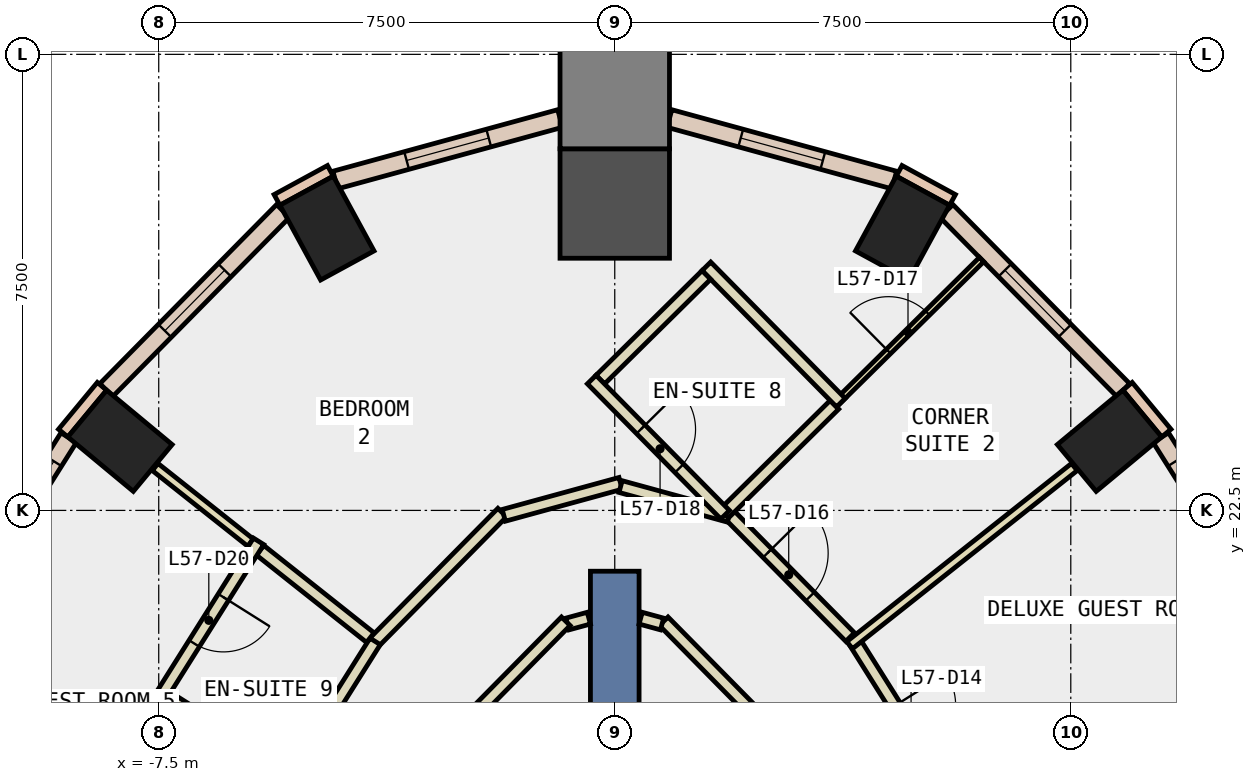
"""IFC4 building model, lengths in metres.
Left out: names, types, materials, properties, quantities, classifications, styles, units other than length and angle.
Written with IfcOpenShell. Run it as: python <this file> out.ifc"""

import sys

from ifc_helpers import new_model, si_unit, direction, frame, frame_2d, origin, origin_2d, place, context, subcontext, project, spatial, rectangle, extrude, element, fill, save


model = new_model("IFC4")
c1 = context("Model", 3, precision=1e-05, world=origin(), true_north=direction((0.0, 1.0)))
c2 = subcontext(c1, "Body", "Model", "MODEL_VIEW")
j1 = project(units=[si_unit("LENGTHUNIT", "METRE"), si_unit("PLANEANGLEUNIT", "RADIAN")], contexts=[c1])
p1 = place(None, origin())
s1 = spatial("IfcSite", under=j1, at=p1, CompositionType="ELEMENT")
p2 = place(p1, origin())
s2 = spatial("IfcBuilding", under=s1, at=p2, CompositionType="ELEMENT")
p3 = place(p2, frame((0.0, 0.0, 252.2)))
s3 = spatial("IfcBuildingStorey", under=s2, at=p3, CompositionType="ELEMENT", Elevation=252.2)
for number, where, z_axis, x_axis in (
    (1, (8.137, 23.645, -0.34), (0.0, 0.0, 1.0), (-0.639, 0.769, 0.0)),
    (2, (4.733, 27.143, -0.34), (0.0, 0.0, 1.0), (-0.878, 0.478, 0.0)),
):
    element("IfcColumn", number, at=place(p3, frame(where, z_axis=z_axis, x_axis=x_axis)), inside=s3, PredefinedType="COLUMN", context=c2, shape_type="SweptSolid", body=[
        extrude(rectangle(XDim=1.0, YDim=1.4, at=origin_2d()), origin(), (0.0, 0.0, 1.0), 3.6),
    ])
p4 = place(p3, frame((0.0, 27.547, -0.34), z_axis=(0.0, 0.0, 1.0), x_axis=(0.0, 1.0, 0.0)))
e3 = element("IfcColumn", 3, at=p4, inside=s3, PredefinedType="COLUMN", context=c2, shape_type="SweptSolid", body=[
    extrude(rectangle(XDim=1.8, YDim=1.8, at=origin_2d()), origin(), (0.0, 0.0, 1.0), 3.6),
])
for number, where, z_axis, x_axis in (
    (4, (-4.733, 27.143, -0.34), (0.0, 0.0, 1.0), (0.878, 0.478, 0.0)),
    (5, (-8.137, 23.645, -0.34), (0.0, 0.0, 1.0), (0.639, 0.769, 0.0)),
):
    element("IfcColumn", number, at=place(p3, frame(where, z_axis=z_axis, x_axis=x_axis)), inside=s3, PredefinedType="COLUMN", context=c2, shape_type="SweptSolid", body=[
        extrude(rectangle(XDim=1.0, YDim=1.4, at=origin_2d()), origin(), (0.0, 0.0, 1.0), 3.6),
    ])
p5 = place(p3, frame((0.0, 29.347, -0.34), z_axis=(0.0, 0.0, 1.0), x_axis=(0.0, 1.0, 0.0)))
e6 = element("IfcColumn", 6, at=p5, inside=s3, PredefinedType="COLUMN", context=c2, shape_type="SweptSolid", body=[
    extrude(rectangle(XDim=1.8, YDim=1.8, at=origin_2d()), origin(), (0.0, 0.0, 1.0), 3.6),
])
p6 = place(p3, frame((0.0, 12.5, -0.34), z_axis=(0.0, 0.0, 1.0), x_axis=(0.0, 1.0, 0.0)))
e7 = element("IfcWall", 7, at=p6, inside=s3, PredefinedType="SHEAR", context=c2, shape_type="SweptSolid", body=[
    extrude(rectangle(XDim=9.0, YDim=0.8, at=frame_2d((4.5, 0.0))), origin(), (0.0, 0.0, 1.0), 3.6),
])
for number, where, z_axis, x_axis in (
    (8, (5.555, 27.606, 0.0), (0.0, 0.0, 1.0), (-0.878, 0.478, 0.0)),
    (9, (-4.677, 28.084, 0.0), (0.0, 0.0, 1.0), (-0.878, -0.478, 0.0)),
):
    element("IfcWall", number, at=place(p3, frame(where, z_axis=z_axis, x_axis=x_axis)), inside=s3, PredefinedType="STANDARD", context=c2, shape_type="SweptSolid", body=[
        extrude(rectangle(XDim=1.0, YDim=0.2, at=frame_2d((0.5, 0.0))), origin(), (0.0, 0.0, 1.0), 3.26),
    ])
for number, where, z_axis, x_axis in (
    (10, (9.071, 23.771, 0.0), (0.0, 0.0, 1.0), (-0.638, 0.77, 0.0)),
    (11, (-8.433, 24.541, 0.0), (0.0, 0.0, 1.0), (-0.638, -0.77, 0.0)),
):
    element("IfcWall", number, at=place(p3, frame(where, z_axis=z_axis, x_axis=x_axis)), inside=s3, PredefinedType="STANDARD", context=c2, shape_type="SweptSolid", body=[
        extrude(rectangle(XDim=1.0, YDim=0.2, at=frame_2d((0.5, 0.0))), origin(), (0.0, 0.0, 1.0), 3.26),
    ])
p7 = place(p3, frame((11.983, 18.926, 0.0), z_axis=(0.0, 0.0, 1.0), x_axis=(-0.532558226688, 0.846393369059, 0.0)))
e12 = element("IfcWall", 12, at=p7, inside=s3, PredefinedType="STANDARD", context=c2, shape_type="SweptSolid", body=[
    extrude(rectangle(XDim=5.637, YDim=0.3, at=frame_2d((2.818, 0.0))), origin(), (0.0, 0.0, 1.0), 3.26),
])
p8 = place(p7, frame((0.459, 0.0, 0.9)))
e13 = element("IfcOpeningElement", 13, at=p8, cuts=e12, PredefinedType="OPENING", context=c2, shape_type="SweptSolid", body=[
    extrude(rectangle(XDim=1.9, YDim=2.0, at=frame_2d((0.95, 1.0))), frame((0.0, 0.16, 0.0), z_axis=(0.0, -1.0, 0.0), x_axis=(1.0, 0.0, 0.0)), (0.0, 0.0, 1.0), 0.32),
])
p9 = place(p7, frame((3.278, 0.0, 0.9)))
e14 = element("IfcOpeningElement", 14, at=p9, cuts=e12, PredefinedType="OPENING", context=c2, shape_type="SweptSolid", body=[
    extrude(rectangle(XDim=1.9, YDim=2.0, at=frame_2d((0.95, 1.0))), frame((0.0, 0.16, 0.0), z_axis=(0.0, -1.0, 0.0), x_axis=(1.0, 0.0, 0.0)), (0.0, 0.0, 1.0), 0.32),
])
p10 = place(p3, frame((8.361, 24.48, 0.0), z_axis=(0.0, 0.0, 1.0), x_axis=(-0.702488411246, 0.711695181989, 0.0)))
e15 = element("IfcWall", 15, at=p10, inside=s3, PredefinedType="STANDARD", context=c2, shape_type="SweptSolid", body=[
    extrude(rectangle(XDim=4.137, YDim=0.3, at=frame_2d((2.068, 0.0))), origin(), (0.0, 0.0, 1.0), 3.26),
])
p11 = place(p10, frame((1.368, 0.0, 0.9)))
e16 = element("IfcOpeningElement", 16, at=p11, cuts=e15, PredefinedType="OPENING", context=c2, shape_type="SweptSolid", body=[
    extrude(rectangle(XDim=1.4, YDim=2.0, at=frame_2d((0.7, 1.0))), frame((0.0, 0.16, 0.0), z_axis=(0.0, -1.0, 0.0), x_axis=(1.0, 0.0, 0.0)), (0.0, 0.0, 1.0), 0.32),
])
p12 = place(p3, frame((4.596, 27.933, 0.0), z_axis=(0.0, 0.0, 1.0), x_axis=(-0.964519409105, 0.264011949464, 0.0)))
e17 = element("IfcWall", 17, at=p12, inside=s3, PredefinedType="STANDARD", context=c2, shape_type="SweptSolid", body=[
    extrude(rectangle(XDim=3.833, YDim=0.3, at=frame_2d((1.917, 0.0))), origin(), (0.0, 0.0, 1.0), 3.26),
])
p13 = place(p12, frame((1.217, 0.0, 0.9)))
e18 = element("IfcOpeningElement", 18, at=p13, cuts=e17, PredefinedType="OPENING", context=c2, shape_type="SweptSolid", body=[
    extrude(rectangle(XDim=1.4, YDim=2.0, at=frame_2d((0.7, 1.0))), frame((0.0, 0.16, 0.0), z_axis=(0.0, -1.0, 0.0), x_axis=(1.0, 0.0, 0.0)), (0.0, 0.0, 1.0), 0.32),
])
p14 = place(p3, frame((-0.899, 28.945, 0.0), z_axis=(0.0, 0.0, 1.0), x_axis=(-0.964519409105, -0.264011949464, 0.0)))
e19 = element("IfcWall", 19, at=p14, inside=s3, PredefinedType="STANDARD", context=c2, shape_type="SweptSolid", body=[
    extrude(rectangle(XDim=3.833, YDim=0.3, at=frame_2d((1.917, 0.0))), origin(), (0.0, 0.0, 1.0), 3.26),
])
p15 = place(p14, frame((1.217, 0.0, 0.9)))
e20 = element("IfcOpeningElement", 20, at=p15, cuts=e19, PredefinedType="OPENING", context=c2, shape_type="SweptSolid", body=[
    extrude(rectangle(XDim=1.4, YDim=2.0, at=frame_2d((0.7, 1.0))), frame((0.0, 0.16, 0.0), z_axis=(0.0, -1.0, 0.0), x_axis=(1.0, 0.0, 0.0)), (0.0, 0.0, 1.0), 0.32),
])
p16 = place(p3, frame((-5.455, 27.424, 0.0), z_axis=(0.0, 0.0, 1.0), x_axis=(-0.702488411246, -0.711695181989, 0.0)))
e21 = element("IfcWall", 21, at=p16, inside=s3, PredefinedType="STANDARD", context=c2, shape_type="SweptSolid", body=[
    extrude(rectangle(XDim=4.137, YDim=0.3, at=frame_2d((2.068, 0.0))), origin(), (0.0, 0.0, 1.0), 3.26),
])
p17 = place(p16, frame((1.368, 0.0, 0.9)))
e22 = element("IfcOpeningElement", 22, at=p17, cuts=e21, PredefinedType="OPENING", context=c2, shape_type="SweptSolid", body=[
    extrude(rectangle(XDim=1.4, YDim=2.0, at=frame_2d((0.7, 1.0))), frame((0.0, 0.16, 0.0), z_axis=(0.0, -1.0, 0.0), x_axis=(1.0, 0.0, 0.0)), (0.0, 0.0, 1.0), 0.32),
])
p18 = place(p3, frame((-8.981, 23.697, 0.0), z_axis=(0.0, 0.0, 1.0), x_axis=(-0.532558226688, -0.846393369059, 0.0)))
e23 = element("IfcWall", 23, at=p18, inside=s3, PredefinedType="STANDARD", context=c2, shape_type="SweptSolid", body=[
    extrude(rectangle(XDim=5.637, YDim=0.3, at=frame_2d((2.818, 0.0))), origin(), (0.0, 0.0, 1.0), 3.26),
])
p19 = place(p18, frame((0.459, 0.0, 0.9)))
e24 = element("IfcOpeningElement", 24, at=p19, cuts=e23, PredefinedType="OPENING", context=c2, shape_type="SweptSolid", body=[
    extrude(rectangle(XDim=1.9, YDim=2.0, at=frame_2d((0.95, 1.0))), frame((0.0, 0.16, 0.0), z_axis=(0.0, -1.0, 0.0), x_axis=(1.0, 0.0, 0.0)), (0.0, 0.0, 1.0), 0.32),
])
p20 = place(p18, frame((3.278, 0.0, 0.9)))
e25 = element("IfcOpeningElement", 25, at=p20, cuts=e23, PredefinedType="OPENING", context=c2, shape_type="SweptSolid", body=[
    extrude(rectangle(XDim=1.9, YDim=2.0, at=frame_2d((0.95, 1.0))), frame((0.0, 0.16, 0.0), z_axis=(0.0, -1.0, 0.0), x_axis=(1.0, 0.0, 0.0)), (0.0, 0.0, 1.0), 0.32),
])
p21 = place(p3, frame((2.294, 19.167, 0.0), z_axis=(0.0, 0.0, 1.0), x_axis=(-0.70213913596, 0.712039769784, 0.0)))
e26 = element("IfcWall", 26, at=p21, inside=s3, PredefinedType="PARTITIONING", context=c2, shape_type="SweptSolid", body=[
    extrude(rectangle(XDim=2.121, YDim=0.2, at=frame_2d((1.06, 0.0))), origin(), (0.0, 0.0, 1.0), 3.26),
])
for number, where, z_axis, x_axis in (
    (27, (0.778, 20.632, 0.0), (0.0, 0.0, 1.0), (-0.965, 0.263, 0.0)),
    (28, (-0.426, 20.728, 0.0), (0.0, 0.0, 1.0), (-0.965, -0.263, 0.0)),
):
    element("IfcWall", number, at=place(p3, frame(where, z_axis=z_axis, x_axis=x_axis)), inside=s3, PredefinedType="PARTITIONING", context=c2, shape_type="SweptSolid", body=[
        extrude(rectangle(XDim=0.365, YDim=0.2, at=frame_2d((0.183, 0.0))), origin(), (0.0, 0.0, 1.0), 3.26),
    ])
p22 = place(p3, frame((-0.805, 20.677, 0.0), z_axis=(0.0, 0.0, 1.0), x_axis=(-0.70213913596, -0.712039769784, 0.0)))
e29 = element("IfcWall", 29, at=p22, inside=s3, PredefinedType="PARTITIONING", context=c2, shape_type="SweptSolid", body=[
    extrude(rectangle(XDim=2.121, YDim=0.2, at=frame_2d((1.06, 0.0))), origin(), (0.0, 0.0, 1.0), 3.26),
])
p23 = place(p3, frame((3.928, 20.367, 0.0), z_axis=(0.0, 0.0, 1.0), x_axis=(0.532616247911, -0.846356858814, 0.0)))
e30 = element("IfcWall", 30, at=p23, inside=s3, PredefinedType="PARTITIONING", context=c2, shape_type="SweptSolid", body=[
    extrude(rectangle(XDim=3.451, YDim=0.2, at=frame_2d((1.726, 0.0))), origin(), (0.0, 0.0, 1.0), 3.26),
])
p24 = place(p23, frame((1.275, 0.0, 0.0)))
e31 = element("IfcOpeningElement", 31, at=p24, cuts=e30, PredefinedType="OPENING", context=c2, shape_type="SweptSolid", body=[
    extrude(rectangle(XDim=1.0, YDim=2.1, at=frame_2d((0.5, 1.05))), frame((0.0, 0.11, 0.0), z_axis=(0.0, -1.0, 0.0), x_axis=(1.0, 0.0, 0.0)), (0.0, 0.0, 1.0), 0.22),
])
p25 = place(p3, frame((1.851, 22.464, 0.0), z_axis=(0.0, 0.0, 1.0), x_axis=(0.70237969133, -0.711802479068, 0.0)))
e32 = element("IfcWall", 32, at=p25, inside=s3, PredefinedType="PARTITIONING", context=c2, shape_type="SweptSolid", body=[
    extrude(rectangle(XDim=2.876, YDim=0.2, at=frame_2d((1.438, 0.0))), origin(), (0.0, 0.0, 1.0), 3.26),
])
p26 = place(p25, frame((0.938, 0.0, 0.0)))
e33 = element("IfcOpeningElement", 33, at=p26, cuts=e32, PredefinedType="OPENING", context=c2, shape_type="SweptSolid", body=[
    extrude(rectangle(XDim=1.0, YDim=2.1, at=frame_2d((0.5, 1.05))), frame((0.0, 0.11, 0.0), z_axis=(0.0, -1.0, 0.0), x_axis=(1.0, 0.0, 0.0)), (0.0, 0.0, 1.0), 0.22),
])
p27 = place(p3, frame((-4.012, 20.275, 0.0), z_axis=(0.0, 0.0, 1.0), x_axis=(0.702488437915, 0.711695155664, 0.0)))
e34 = element("IfcWall", 34, at=p27, inside=s3, PredefinedType="PARTITIONING", context=c2, shape_type="SweptSolid", body=[
    extrude(rectangle(XDim=3.076, YDim=0.2, at=frame_2d((1.538, 0.0))), origin(), (0.0, 0.0, 1.0), 3.26),
])
p28 = place(p3, frame((-1.825, 22.419, 0.0), z_axis=(0.0, 0.0, 1.0), x_axis=(0.964477541401, 0.26416485787, 0.0)))
e35 = element("IfcWall", 35, at=p28, inside=s3, PredefinedType="PARTITIONING", context=c2, shape_type="SweptSolid", body=[
    extrude(rectangle(XDim=1.992, YDim=0.2, at=frame_2d((0.996, 0.0))), origin(), (0.0, 0.0, 1.0), 3.26),
])
p29 = place(p3, frame((0.096, 22.892, 0.0), z_axis=(0.0, 0.0, 1.0), x_axis=(0.964519582336, -0.264011316595, 0.0)))
e36 = element("IfcWall", 36, at=p29, inside=s3, PredefinedType="PARTITIONING", context=c2, shape_type="SweptSolid", body=[
    extrude(rectangle(XDim=1.849, YDim=0.2, at=frame_2d((0.924, 0.0))), origin(), (0.0, 0.0, 1.0), 3.26),
])
p30 = place(p3, frame((-5.273, 18.23, 0.0), z_axis=(0.0, 0.0, 1.0), x_axis=(0.532743344325, 0.846276863135, 0.0)))
e37 = element("IfcWall", 37, at=p30, inside=s3, PredefinedType="PARTITIONING", context=c2, shape_type="SweptSolid", body=[
    extrude(rectangle(XDim=2.5, YDim=0.2, at=frame_2d((1.25, 0.0))), origin(), (0.0, 0.0, 1.0), 3.26),
])
p31 = place(p3, frame((3.863, 20.284, 0.0), z_axis=(0.0, 0.0, 1.0), x_axis=(0.783618453885, 0.621242399335, 0.0)))
e38 = element("IfcWall", 38, at=p31, inside=s3, PredefinedType="PARTITIONING", context=c2, shape_type="SweptSolid", body=[
    extrude(rectangle(XDim=4.717, YDim=0.15, at=frame_2d((2.358, 0.0))), origin(), (0.0, 0.0, 1.0), 3.26),
])
p32 = place(p3, frame((3.613, 24.237, 0.0), z_axis=(0.0, 0.0, 1.0), x_axis=(0.711651188682, 0.702532978335, 0.0)))
e39 = element("IfcWall", 39, at=p32, inside=s3, PredefinedType="PARTITIONING", context=c2, shape_type="SweptSolid", body=[
    extrude(rectangle(XDim=3.4, YDim=0.1, at=frame_2d((1.7, 0.0))), origin(), (0.0, 0.0, 1.0), 3.26),
])
p33 = place(p32, frame((1.25, 0.0, 0.0)))
e40 = element("IfcOpeningElement", 40, at=p33, cuts=e39, PredefinedType="OPENING", context=c2, shape_type="SweptSolid", body=[
    extrude(rectangle(XDim=0.9, YDim=2.1, at=frame_2d((0.45, 1.05))), frame((0.0, 0.06, 0.0), z_axis=(0.0, -1.0, 0.0), x_axis=(1.0, 0.0, 0.0)), (0.0, 0.0, 1.0), 0.12),
])
p34 = place(p3, frame((1.798, 22.446, 0.0), z_axis=(0.0, 0.0, 1.0), x_axis=(0.711782817297, 0.702399616316, 0.0)))
e41 = element("IfcWall", 41, at=p34, inside=s3, PredefinedType="PARTITIONING", context=c2, shape_type="SweptSolid", body=[
    extrude(rectangle(XDim=2.55, YDim=0.2, at=frame_2d((1.275, 0.0))), origin(), (0.0, 0.0, 1.0), 3.26),
])
p35 = place(p3, frame((3.719, 24.272, 0.0), z_axis=(0.0, 0.0, 1.0), x_axis=(-0.70232328337, 0.711858135893, 0.0)))
e42 = element("IfcWall", 42, at=p35, inside=s3, PredefinedType="PARTITIONING", context=c2, shape_type="SweptSolid", body=[
    extrude(rectangle(XDim=3.149, YDim=0.2, at=frame_2d((1.575, 0.0))), origin(), (0.0, 0.0, 1.0), 3.26),
])
p36 = place(p3, frame((1.506, 26.372, 0.0), z_axis=(0.0, 0.0, 1.0), x_axis=(-0.711773999329, -0.702408551969, 0.0)))
e43 = element("IfcWall", 43, at=p36, inside=s3, PredefinedType="PARTITIONING", context=c2, shape_type="SweptSolid", body=[
    extrude(rectangle(XDim=2.45, YDim=0.2, at=frame_2d((1.225, 0.0))), origin(), (0.0, 0.0, 1.0), 3.26),
])
p37 = place(p3, frame((-0.379, 24.652, 0.0), z_axis=(0.0, 0.0, 1.0), x_axis=(0.702559610983, -0.711624896286, 0.0)))
e44 = element("IfcWall", 44, at=p37, inside=s3, PredefinedType="PARTITIONING", context=c2, shape_type="SweptSolid", body=[
    extrude(rectangle(XDim=3.124, YDim=0.2, at=frame_2d((1.562, 0.0))), origin(), (0.0, 0.0, 1.0), 3.26),
])
p38 = place(p37, frame((1.15, 0.0, 0.0)))
e45 = element("IfcOpeningElement", 45, at=p38, cuts=e44, PredefinedType="OPENING", context=c2, shape_type="SweptSolid", body=[
    extrude(rectangle(XDim=0.9, YDim=2.1, at=frame_2d((0.45, 1.05))), frame((0.0, 0.11, 0.0), z_axis=(0.0, -1.0, 0.0), x_axis=(1.0, 0.0, 0.0)), (0.0, 0.0, 1.0), 0.22),
])
p39 = place(p3, frame((-5.99, 21.97, 0.0), z_axis=(0.0, 0.0, 1.0), x_axis=(-0.783573405437, 0.621299218003, 0.0)))
e46 = element("IfcWall", 46, at=p39, inside=s3, PredefinedType="PARTITIONING", context=c2, shape_type="SweptSolid", body=[
    extrude(rectangle(XDim=2.002, YDim=0.15, at=frame_2d((1.001, 0.0))), origin(), (0.0, 0.0, 1.0), 3.26),
])
p40 = place(p3, frame((-4.02, 20.408, 0.0), z_axis=(0.0, 0.0, 1.0), x_axis=(-0.783681902275, 0.621162358846, 0.0)))
e47 = element("IfcWall", 47, at=p40, inside=s3, PredefinedType="PARTITIONING", context=c2, shape_type="SweptSolid", body=[
    extrude(rectangle(XDim=2.313, YDim=0.2, at=frame_2d((1.157, 0.0))), origin(), (0.0, 0.0, 1.0), 3.26),
])
p41 = place(p3, frame((-5.858, 21.992, 0.0), z_axis=(0.0, 0.0, 1.0), x_axis=(-0.532874387162, -0.846194355634, 0.0)))
e48 = element("IfcWall", 48, at=p41, inside=s3, PredefinedType="PARTITIONING", context=c2, shape_type="SweptSolid", body=[
    extrude(rectangle(XDim=3.073, YDim=0.2, at=frame_2d((1.536, 0.0))), origin(), (0.0, 0.0, 1.0), 3.26),
])
p42 = place(p41, frame((1.086, 0.0, 0.0)))
e49 = element("IfcOpeningElement", 49, at=p42, cuts=e48, PredefinedType="OPENING", context=c2, shape_type="SweptSolid", body=[
    extrude(rectangle(XDim=0.9, YDim=2.1, at=frame_2d((0.45, 1.05))), frame((0.0, 0.11, 0.0), z_axis=(0.0, -1.0, 0.0), x_axis=(1.0, 0.0, 0.0)), (0.0, 0.0, 1.0), 0.22),
])
p43 = place(p3, frame((-7.357, 19.423, 0.0), z_axis=(0.0, 0.0, 1.0), x_axis=(0.846270070045, -0.532754135176, 0.0)))
e50 = element("IfcWall", 50, at=p43, inside=s3, PredefinedType="PARTITIONING", context=c2, shape_type="SweptSolid", body=[
    extrude(rectangle(XDim=2.3, YDim=0.2, at=frame_2d((1.15, 0.0))), origin(), (0.0, 0.0, 1.0), 3.26),
])
p44 = place(p9, origin())
e51 = element("IfcWindow", 51, at=p44, inside=s3, PartitioningType="SINGLE_PANEL", PredefinedType="WINDOW", context=c2, shape_type="SweptSolid", body=[
    extrude(rectangle(XDim=1.9, YDim=2.0, at=frame_2d((0.95, 1.0))), frame((0.0, 0.03, 0.0), z_axis=(0.0, -1.0, 0.0), x_axis=(1.0, 0.0, 0.0)), (0.0, 0.0, 1.0), 0.06),
])
fill(e14, e51)
p45 = place(p11, origin())
e52 = element("IfcWindow", 52, at=p45, inside=s3, PartitioningType="SINGLE_PANEL", PredefinedType="WINDOW", context=c2, shape_type="SweptSolid", body=[
    extrude(rectangle(XDim=1.4, YDim=2.0, at=frame_2d((0.7, 1.0))), frame((0.0, 0.03, 0.0), z_axis=(0.0, -1.0, 0.0), x_axis=(1.0, 0.0, 0.0)), (0.0, 0.0, 1.0), 0.06),
])
fill(e16, e52)
p46 = place(p13, origin())
e53 = element("IfcWindow", 53, at=p46, inside=s3, PartitioningType="SINGLE_PANEL", PredefinedType="WINDOW", context=c2, shape_type="SweptSolid", body=[
    extrude(rectangle(XDim=1.4, YDim=2.0, at=frame_2d((0.7, 1.0))), frame((0.0, 0.03, 0.0), z_axis=(0.0, -1.0, 0.0), x_axis=(1.0, 0.0, 0.0)), (0.0, 0.0, 1.0), 0.06),
])
fill(e18, e53)
p47 = place(p15, origin())
e54 = element("IfcWindow", 54, at=p47, inside=s3, PartitioningType="SINGLE_PANEL", PredefinedType="WINDOW", context=c2, shape_type="SweptSolid", body=[
    extrude(rectangle(XDim=1.4, YDim=2.0, at=frame_2d((0.7, 1.0))), frame((0.0, 0.03, 0.0), z_axis=(0.0, -1.0, 0.0), x_axis=(1.0, 0.0, 0.0)), (0.0, 0.0, 1.0), 0.06),
])
fill(e20, e54)
p48 = place(p17, origin())
e55 = element("IfcWindow", 55, at=p48, inside=s3, PartitioningType="SINGLE_PANEL", PredefinedType="WINDOW", context=c2, shape_type="SweptSolid", body=[
    extrude(rectangle(XDim=1.4, YDim=2.0, at=frame_2d((0.7, 1.0))), frame((0.0, 0.03, 0.0), z_axis=(0.0, -1.0, 0.0), x_axis=(1.0, 0.0, 0.0)), (0.0, 0.0, 1.0), 0.06),
])
fill(e22, e55)
p49 = place(p19, origin())
e56 = element("IfcWindow", 56, at=p49, inside=s3, PartitioningType="SINGLE_PANEL", PredefinedType="WINDOW", context=c2, shape_type="SweptSolid", body=[
    extrude(rectangle(XDim=1.9, YDim=2.0, at=frame_2d((0.95, 1.0))), frame((0.0, 0.03, 0.0), z_axis=(0.0, -1.0, 0.0), x_axis=(1.0, 0.0, 0.0)), (0.0, 0.0, 1.0), 0.06),
])
fill(e24, e56)
p50 = place(p26, origin())
e57 = element("IfcDoor", 57, at=p50, inside=s3, OperationType="SINGLE_SWING_LEFT", PredefinedType="DOOR", context=c2, shape_type="SweptSolid", body=[
    extrude(rectangle(XDim=1.0, YDim=2.1, at=frame_2d((0.5, 1.05))), frame((0.0, 0.025, 0.0), z_axis=(0.0, -1.0, 0.0), x_axis=(1.0, 0.0, 0.0)), (0.0, 0.0, 1.0), 0.05),
])
fill(e33, e57)
p51 = place(p33, origin())
e58 = element("IfcDoor", 58, at=p51, inside=s3, OperationType="SINGLE_SWING_RIGHT", PredefinedType="DOOR", context=c2, shape_type="SweptSolid", body=[
    extrude(rectangle(XDim=0.9, YDim=2.1, at=frame_2d((0.45, 1.05))), frame((0.0, 0.025, 0.0), z_axis=(0.0, -1.0, 0.0), x_axis=(1.0, 0.0, 0.0)), (0.0, 0.0, 1.0), 0.05),
])
fill(e40, e58)
p52 = place(p38, origin())
e59 = element("IfcDoor", 59, at=p52, inside=s3, OperationType="SINGLE_SWING_RIGHT", PredefinedType="DOOR", context=c2, shape_type="SweptSolid", body=[
    extrude(rectangle(XDim=0.9, YDim=2.1, at=frame_2d((0.45, 1.05))), frame((0.0, 0.025, 0.0), z_axis=(0.0, -1.0, 0.0), x_axis=(1.0, 0.0, 0.0)), (0.0, 0.0, 1.0), 0.05),
])
fill(e45, e59)
p53 = place(p42, origin())
e60 = element("IfcDoor", 60, at=p53, inside=s3, OperationType="SINGLE_SWING_LEFT", PredefinedType="DOOR", context=c2, shape_type="SweptSolid", body=[
    extrude(rectangle(XDim=0.9, YDim=2.1, at=frame_2d((0.45, 1.05))), frame((0.0, 0.025, 0.0), z_axis=(0.0, -1.0, 0.0), x_axis=(1.0, 0.0, 0.0)), (0.0, 0.0, 1.0), 0.05),
])
fill(e49, e60)
save(model, sys.argv[1])
